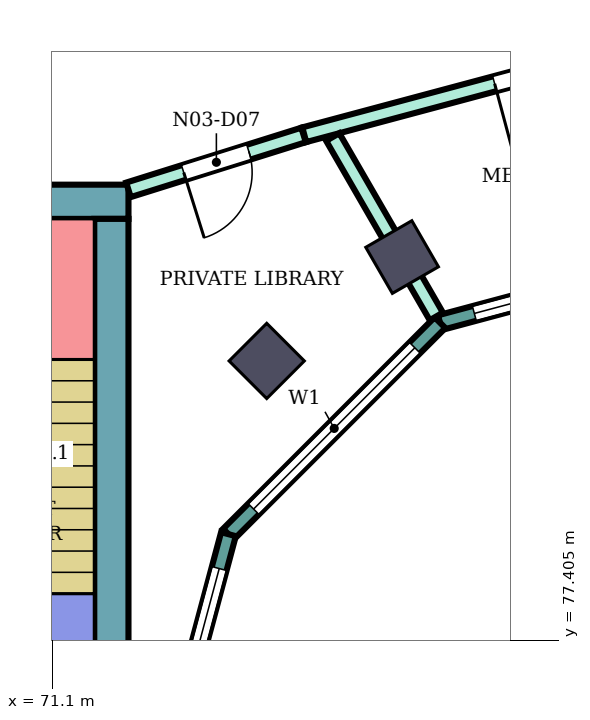
"""IFC4 building model, lengths in metres.
Left out: names, types, materials, properties, quantities, classifications, styles, units other than length and angle.
Written with IfcOpenShell. Run it as: python <this file> out.ifc"""

import sys

from ifc_helpers import new_model, si_unit, direction, frame, frame_2d, origin, origin_2d, place, context, subcontext, project, spatial, rectangle, extrude, element, fill, save


model = new_model("IFC4")
c1 = context("Model", 3, precision=1e-05, world=origin(), true_north=direction((0.0, 1.0)))
c2 = subcontext(c1, "Body", "Model", "MODEL_VIEW")
j1 = project(units=[si_unit("LENGTHUNIT", "METRE"), si_unit("PLANEANGLEUNIT", "RADIAN")], contexts=[c1])
p1 = place(None, origin())
s1 = spatial("IfcSite", under=j1, at=p1, CompositionType="ELEMENT")
p2 = place(p1, origin())
s2 = spatial("IfcBuilding", under=s1, at=p2, CompositionType="ELEMENT")
p3 = place(p2, frame((0.0, 0.0, 296.7)))
s3 = spatial("IfcBuildingStorey", under=s2, at=p3, CompositionType="ELEMENT", Elevation=296.7)
for number, where, z_axis, x_axis in (
    (1, (75.7, 82.448, 0.0), (0.0, 0.0, 1.0), (-0.5, 0.866, 0.0)),
    (2, (73.919, 81.081, 0.0), (0.0, 0.0, 1.0), (-0.707, 0.707, 0.0)),
):
    element("IfcColumn", number, at=place(p3, frame(where, z_axis=z_axis, x_axis=x_axis)), inside=s3, PredefinedType="COLUMN", context=c2, shape_type="SweptSolid", body=[
        extrude(rectangle(XDim=0.7, YDim=0.7, at=origin_2d()), origin(), (0.0, 0.0, 1.0), 4.2),
    ])
p4 = place(p3, frame((72.1, 83.175, 0.0), z_axis=(0.0, 0.0, 1.0), x_axis=(-1.0, 0.0, 0.0)))
e3 = element("IfcWall", 3, at=p4, inside=s3, PredefinedType="SHEAR", context=c2, shape_type="SweptSolid", body=[
    extrude(rectangle(XDim=12.0, YDim=0.45, at=frame_2d((6.0, 0.0))), origin(), (0.0, 0.0, 1.0), 3.88),
])
p5 = place(p4, frame((4.2, 0.0, 0.0)))
e4 = element("IfcOpeningElement", 4, at=p5, cuts=e3, PredefinedType="OPENING", context=c2, shape_type="SweptSolid", body=[
    extrude(rectangle(XDim=2.4, YDim=2.4, at=frame_2d((1.2, 1.2))), frame((0.0, 0.235, 0.0), z_axis=(0.0, -1.0, 0.0), x_axis=(1.0, 0.0, 0.0)), (0.0, 0.0, 1.0), 0.47),
])
p6 = place(p3, frame((71.875, 82.95, 0.0), z_axis=(0.0, 0.0, 1.0), x_axis=(0.0, -1.0, 0.0)))
e5 = element("IfcWall", 5, at=p6, inside=s3, PredefinedType="SHEAR", context=c2, shape_type="SweptSolid", body=[
    extrude(rectangle(XDim=7.95, YDim=0.45, at=frame_2d((3.975, 0.0))), origin(), (0.0, 0.0, 1.0), 3.88),
])
p7 = place(p3, frame((80.0, 82.604, 0.0), z_axis=(0.0, 0.0, 1.0), x_axis=(-0.965933654434, -0.258789828301, 0.0)))
e6 = element("IfcWall", 6, at=p7, inside=s3, PredefinedType="NOTDEFINED", context=c2, shape_type="SweptSolid", body=[
    extrude(rectangle(XDim=3.936, YDim=0.2, at=frame_2d((1.968, 0.0))), origin(), (0.0, 0.0, 1.0), 4.2),
])
p8 = place(p7, frame((0.468, 0.0, 0.9)))
e7 = element("IfcOpeningElement", 7, at=p8, cuts=e6, PredefinedType="OPENING", context=c2, shape_type="SweptSolid", body=[
    extrude(rectangle(XDim=3.0, YDim=2.3, at=frame_2d((1.5, 1.15))), frame((0.0, 0.11, 0.0), z_axis=(0.0, -1.0, 0.0), x_axis=(1.0, 0.0, 0.0)), (0.0, 0.0, 1.0), 0.22),
])
p9 = place(p3, frame((76.198, 81.585, 0.0), z_axis=(0.0, 0.0, 1.0), x_axis=(-0.707106781187, -0.707106781187, 0.0)))
e8 = element("IfcWall", 8, at=p9, inside=s3, PredefinedType="NOTDEFINED", context=c2, shape_type="SweptSolid", body=[
    extrude(rectangle(XDim=3.936, YDim=0.2, at=frame_2d((1.968, 0.0))), origin(), (0.0, 0.0, 1.0), 4.2),
])
p10 = place(p9, frame((0.468, 0.0, 0.9)))
e9 = element("IfcOpeningElement", 9, at=p10, cuts=e8, PredefinedType="OPENING", context=c2, shape_type="SweptSolid", body=[
    extrude(rectangle(XDim=3.0, YDim=2.3, at=frame_2d((1.5, 1.15))), frame((0.0, 0.11, 0.0), z_axis=(0.0, -1.0, 0.0), x_axis=(1.0, 0.0, 0.0)), (0.0, 0.0, 1.0), 0.22),
])
p11 = place(p3, frame((73.415, 78.802, 0.0), z_axis=(0.0, 0.0, 1.0), x_axis=(-0.258789828301, -0.965933654434, 0.0)))
e10 = element("IfcWall", 10, at=p11, inside=s3, PredefinedType="NOTDEFINED", context=c2, shape_type="SweptSolid", body=[
    extrude(rectangle(XDim=3.936, YDim=0.2, at=frame_2d((1.968, 0.0))), origin(), (0.0, 0.0, 1.0), 4.2),
])
p12 = place(p11, frame((0.468, 0.0, 0.9)))
e11 = element("IfcOpeningElement", 11, at=p12, cuts=e10, PredefinedType="OPENING", context=c2, shape_type="SweptSolid", body=[
    extrude(rectangle(XDim=3.0, YDim=2.3, at=frame_2d((1.5, 1.15))), frame((0.0, 0.11, 0.0), z_axis=(0.0, -1.0, 0.0), x_axis=(1.0, 0.0, 0.0)), (0.0, 0.0, 1.0), 0.22),
])
p13 = place(p3, frame((68.201, 84.833, 0.0), z_axis=(0.0, 0.0, 1.0), x_axis=(0.95420102455, 0.299166182492, 0.0)))
e12 = element("IfcWall", 12, at=p13, inside=s3, PredefinedType="PARTITIONING", context=c2, shape_type="SweptSolid", body=[
    extrude(rectangle(XDim=5.74, YDim=0.2, at=frame_2d((2.87, 0.0))), origin(), (0.0, 0.0, 1.0), 3.75),
])
p14 = place(p13, frame((2.374, 0.0, 0.0)))
e13 = element("IfcOpeningElement", 13, at=p14, cuts=e12, PredefinedType="OPENING", context=c2, shape_type="SweptSolid", body=[
    extrude(rectangle(XDim=1.0, YDim=2.1, at=frame_2d((0.5, 1.05))), frame((0.0, 0.11, 0.0), z_axis=(0.0, -1.0, 0.0), x_axis=(1.0, 0.0, 0.0)), (0.0, 0.0, 1.0), 0.22),
])
p15 = place(p3, frame((72.1, 83.332, 0.0), z_axis=(0.0, 0.0, 1.0), x_axis=(0.954233106619, 0.299063836383, 0.0)))
e14 = element("IfcWall", 14, at=p15, inside=s3, PredefinedType="PARTITIONING", context=c2, shape_type="SweptSolid", body=[
    extrude(rectangle(XDim=2.414, YDim=0.2, at=frame_2d((1.207, 0.0))), origin(), (0.0, 0.0, 1.0), 3.75),
])
p16 = place(p15, frame((0.762, 0.0, 0.0)))
e15 = element("IfcOpeningElement", 15, at=p16, cuts=e14, PredefinedType="OPENING", context=c2, shape_type="SweptSolid", body=[
    extrude(rectangle(XDim=0.9, YDim=2.1, at=frame_2d((0.45, 1.05))), frame((0.0, 0.11, 0.0), z_axis=(0.0, -1.0, 0.0), x_axis=(1.0, 0.0, 0.0)), (0.0, 0.0, 1.0), 0.22),
])
p17 = place(p3, frame((74.413, 84.057, 0.0), z_axis=(0.0, 0.0, 1.0), x_axis=(0.965972135939, 0.258646153246, 0.0)))
e16 = element("IfcWall", 16, at=p17, inside=s3, PredefinedType="PARTITIONING", context=c2, shape_type="SweptSolid", body=[
    extrude(rectangle(XDim=5.654, YDim=0.2, at=frame_2d((2.827, 0.0))), origin(), (0.0, 0.0, 1.0), 3.75),
])
p18 = place(p17, frame((2.593, 0.0, 0.0)))
e17 = element("IfcOpeningElement", 17, at=p18, cuts=e16, PredefinedType="OPENING", context=c2, shape_type="SweptSolid", body=[
    extrude(rectangle(XDim=0.9, YDim=2.1, at=frame_2d((0.45, 1.05))), frame((0.0, 0.11, 0.0), z_axis=(0.0, -1.0, 0.0), x_axis=(1.0, 0.0, 0.0)), (0.0, 0.0, 1.0), 0.22),
])
p19 = place(p3, frame((74.787, 84.027, 0.0), z_axis=(0.0, 0.0, 1.0), x_axis=(0.500079107518, -0.86597972622, 0.0)))
e18 = element("IfcWall", 18, at=p19, inside=s3, PredefinedType="PARTITIONING", context=c2, shape_type="SweptSolid", body=[
    extrude(rectangle(XDim=2.726, YDim=0.2, at=frame_2d((1.363, 0.0))), origin(), (0.0, 0.0, 1.0), 3.75),
])
p20 = place(p8, origin())
e19 = element("IfcWindow", 19, at=p20, inside=s3, PartitioningType="SINGLE_PANEL", PredefinedType="WINDOW", context=c2, shape_type="SweptSolid", body=[
    extrude(rectangle(XDim=3.0, YDim=2.3, at=frame_2d((1.5, 1.15))), frame((0.0, 0.03, 0.0), z_axis=(0.0, -1.0, 0.0), x_axis=(1.0, 0.0, 0.0)), (0.0, 0.0, 1.0), 0.06),
])
fill(e7, e19)
p21 = place(p10, origin())
e20 = element("IfcWindow", 20, at=p21, inside=s3, PartitioningType="SINGLE_PANEL", PredefinedType="WINDOW", context=c2, shape_type="SweptSolid", body=[
    extrude(rectangle(XDim=3.0, YDim=2.3, at=frame_2d((1.5, 1.15))), frame((0.0, 0.03, 0.0), z_axis=(0.0, -1.0, 0.0), x_axis=(1.0, 0.0, 0.0)), (0.0, 0.0, 1.0), 0.06),
])
fill(e9, e20)
p22 = place(p12, origin())
e21 = element("IfcWindow", 21, at=p22, inside=s3, PartitioningType="SINGLE_PANEL", PredefinedType="WINDOW", context=c2, shape_type="SweptSolid", body=[
    extrude(rectangle(XDim=3.0, YDim=2.3, at=frame_2d((1.5, 1.15))), frame((0.0, 0.03, 0.0), z_axis=(0.0, -1.0, 0.0), x_axis=(1.0, 0.0, 0.0)), (0.0, 0.0, 1.0), 0.06),
])
fill(e11, e21)
p23 = place(p18, frame((0.9, 0.0, 0.0), z_axis=(0.0, 0.0, 1.0), x_axis=(-1.0, 0.0, 0.0)))
e22 = element("IfcDoor", 22, at=p23, inside=s3, OperationType="SINGLE_SWING_RIGHT", PredefinedType="DOOR", context=c2, shape_type="SweptSolid", body=[
    extrude(rectangle(XDim=0.9, YDim=2.1, at=frame_2d((0.45, 1.05))), frame((0.0, 0.025, 0.0), z_axis=(0.0, -1.0, 0.0), x_axis=(1.0, 0.0, 0.0)), (0.0, 0.0, 1.0), 0.05),
])
fill(e17, e22)
p24 = place(p16, frame((0.9, 0.0, 0.0), z_axis=(0.0, 0.0, 1.0), x_axis=(-1.0, 0.0, 0.0)))
e23 = element("IfcDoor", 23, at=p24, inside=s3, OperationType="SINGLE_SWING_RIGHT", PredefinedType="DOOR", context=c2, shape_type="SweptSolid", body=[
    extrude(rectangle(XDim=0.9, YDim=2.1, at=frame_2d((0.45, 1.05))), frame((0.0, 0.025, 0.0), z_axis=(0.0, -1.0, 0.0), x_axis=(1.0, 0.0, 0.0)), (0.0, 0.0, 1.0), 0.05),
])
fill(e15, e23)
save(model, sys.argv[1])
